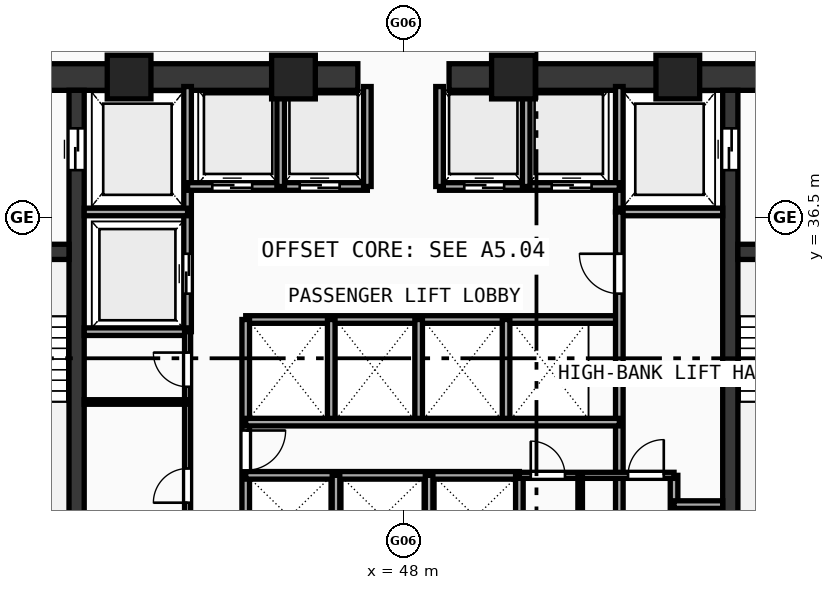
"""IFC4 building model, lengths in metres.
Left out: names, types, materials, properties, quantities, classifications, styles, units other than length and angle.
Written with IfcOpenShell. Run it as: python <this file> out.ifc"""

import sys

from ifc_helpers import new_model, si_unit, direction, frame, frame_2d, origin, origin_with_axes, origin_2d, place, context, subcontext, project, spatial, rectangle, hollow_rectangle, extrude, source, transform, mapped, element, fill, save


model = new_model("IFC4")
c1 = context("Model", 3, precision=1e-05, world=origin(), true_north=direction((0.0, 1.0)))
c2 = subcontext(c1, "Body", "Model", "MODEL_VIEW")
j1 = project(units=[si_unit("LENGTHUNIT", "METRE"), si_unit("PLANEANGLEUNIT", "RADIAN")], contexts=[c1])
p1 = place(None, origin())
s1 = spatial("IfcSite", under=j1, at=p1, CompositionType="ELEMENT")
p2 = place(p1, origin())
s2 = spatial("IfcBuilding", under=s1, at=p2, CompositionType="ELEMENT")
p3 = place(p2, frame((0.0, 0.0, 19.2)))
s3 = spatial("IfcBuildingStorey", under=s2, at=p3, CompositionType="ELEMENT", Elevation=19.2)
p4 = place(p3, frame((35.45, 40.2, 0.0), z_axis=(0.0, 0.0, 1.0), x_axis=(1.0, 0.0, 0.0)))
e1 = element("IfcWall", 1, at=p4, inside=s3, PredefinedType="SHEAR", context=c2, shape_type="SweptSolid", body=[
    extrude(rectangle(XDim=11.35, YDim=0.7, at=frame_2d((5.675, 0.0))), origin(), (0.0, 0.0, 1.0), 5.92),
])
p5 = place(p4, frame((1.7, 0.0, 0.0)))
e2 = element("IfcOpeningElement", 2, at=p5, cuts=e1, PredefinedType="OPENING", context=c2, shape_type="SweptSolid", body=[
    extrude(rectangle(XDim=1.05, YDim=2.1, at=frame_2d((0.525, 1.05))), frame((0.0, 0.36, 0.0), z_axis=(0.0, -1.0, 0.0), x_axis=(1.0, 0.0, 0.0)), (0.0, 0.0, 1.0), 0.72),
])
p6 = place(p3, frame((49.2, 40.2, 0.0), z_axis=(0.0, 0.0, 1.0), x_axis=(1.0, 0.0, 0.0)))
e3 = element("IfcWall", 3, at=p6, inside=s3, PredefinedType="SHEAR", context=c2, shape_type="SweptSolid", body=[
    extrude(rectangle(XDim=11.35, YDim=0.7, at=frame_2d((5.675, 0.0))), origin(), (0.0, 0.0, 1.0), 5.92),
])
p7 = place(p6, frame((8.6, 0.0, 0.0)))
e4 = element("IfcOpeningElement", 4, at=p7, cuts=e3, PredefinedType="OPENING", context=c2, shape_type="SweptSolid", body=[
    extrude(rectangle(XDim=1.05, YDim=2.1, at=frame_2d((0.525, 1.05))), frame((0.0, 0.36, 0.0), z_axis=(0.0, -1.0, 0.0), x_axis=(1.0, 0.0, 0.0)), (0.0, 0.0, 1.0), 0.72),
])
p8 = place(p3, frame((39.4, 27.85, 0.0), z_axis=(0.0, 0.0, 1.0), x_axis=(0.0, 1.0, 0.0)))
e5 = element("IfcWall", 5, at=p8, inside=s3, PredefinedType="SHEAR", context=c2, shape_type="SweptSolid", body=[
    extrude(rectangle(XDim=12.0, YDim=0.4, at=frame_2d((6.0, 0.0))), origin(), (0.0, 0.0, 1.0), 5.92),
])
p9 = place(p8, frame((9.9, 0.0, 0.0)))
e6 = element("IfcOpeningElement", 6, at=p9, cuts=e5, PredefinedType="OPENING", context=c2, shape_type="SweptSolid", body=[
    extrude(rectangle(XDim=1.1, YDim=2.1, at=frame_2d((0.55, 1.05))), frame((0.0, 0.21, 0.0), z_axis=(0.0, -1.0, 0.0), x_axis=(1.0, 0.0, 0.0)), (0.0, 0.0, 1.0), 0.42),
])
p10 = place(p3, frame((56.6, 27.85, 0.0), z_axis=(0.0, 0.0, 1.0), x_axis=(0.0, 1.0, 0.0)))
e7 = element("IfcWall", 7, at=p10, inside=s3, PredefinedType="SHEAR", context=c2, shape_type="SweptSolid", body=[
    extrude(rectangle(XDim=12.0, YDim=0.4, at=frame_2d((6.0, 0.0))), origin(), (0.0, 0.0, 1.0), 5.92),
])
p11 = place(p10, frame((9.9, 0.0, 0.0)))
e8 = element("IfcOpeningElement", 8, at=p11, cuts=e7, PredefinedType="OPENING", context=c2, shape_type="SweptSolid", body=[
    extrude(rectangle(XDim=1.1, YDim=2.1, at=frame_2d((0.55, 1.05))), frame((0.0, 0.21, 0.0), z_axis=(0.0, -1.0, 0.0), x_axis=(1.0, 0.0, 0.0)), (0.0, 0.0, 1.0), 0.42),
])
p12 = place(p3, frame((36.15, 35.6, 0.0), z_axis=(0.0, 0.0, 1.0), x_axis=(1.0, 0.0, 0.0)))
e9 = element("IfcWall", 9, at=p12, inside=s3, PredefinedType="SHEAR", context=c2, shape_type="SweptSolid", body=[
    extrude(rectangle(XDim=3.05, YDim=0.4, at=frame_2d((1.525, 0.0))), origin(), (0.0, 0.0, 1.0), 5.92),
])
p13 = place(p12, frame((0.97, 0.0, 0.0)))
e10 = element("IfcOpeningElement", 10, at=p13, cuts=e9, PredefinedType="OPENING", context=c2, shape_type="SweptSolid", body=[
    extrude(rectangle(XDim=1.05, YDim=2.1, at=frame_2d((0.525, 1.05))), frame((0.0, 0.21, 0.0), z_axis=(0.0, -1.0, 0.0), x_axis=(1.0, 0.0, 0.0)), (0.0, 0.0, 1.0), 0.42),
])
p14 = place(p3, frame((56.8, 35.6, 0.0), z_axis=(0.0, 0.0, 1.0), x_axis=(1.0, 0.0, 0.0)))
e11 = element("IfcWall", 11, at=p14, inside=s3, PredefinedType="SHEAR", context=c2, shape_type="SweptSolid", body=[
    extrude(rectangle(XDim=3.05, YDim=0.4, at=frame_2d((1.525, 0.0))), origin(), (0.0, 0.0, 1.0), 5.92),
])
p15 = place(p14, frame((1.02, 0.0, 0.0)))
e12 = element("IfcOpeningElement", 12, at=p15, cuts=e11, PredefinedType="OPENING", context=c2, shape_type="SweptSolid", body=[
    extrude(rectangle(XDim=1.05, YDim=2.1, at=frame_2d((0.525, 1.05))), frame((0.0, 0.21, 0.0), z_axis=(0.0, -1.0, 0.0), x_axis=(1.0, 0.0, 0.0)), (0.0, 0.0, 1.0), 0.42),
])
m1 = source(origin(), c2, "Body", "SweptSolid", [
    extrude(hollow_rectangle(XDim=1.15, YDim=1.15, WallThickness=0.048, at=origin_2d()), origin(), (0.0, 0.0, 1.0), 6.2),
])
for number, where, z_axis, x_axis in (
    (13, (55.219, 40.2, -0.28), (0.0, 0.0, 1.0), (1.0, 0.0, 0.0)),
    (14, (50.894, 40.2, -0.28), (0.0, 0.0, 1.0), (1.0, 0.0, 0.0)),
    (15, (45.106, 40.2, -0.28), (0.0, 0.0, 1.0), (1.0, 0.0, 0.0)),
    (16, (40.781, 40.2, -0.28), (0.0, 0.0, 1.0), (1.0, 0.0, 0.0)),
):
    element("IfcColumn", number, at=place(p3, frame(where, z_axis=z_axis, x_axis=x_axis)), inside=s3, PredefinedType="COLUMN", context=c2, shape_type="MappedRepresentation", body=[
        mapped(m1, transform((0.0, 0.0, 0.0), scale=1.0)),
    ])
p16 = place(p3, frame((42.32, 33.5, 0.0), z_axis=(0.0, 0.0, 1.0), x_axis=(0.0, 1.0, 0.0)))
e17 = element("IfcWall", 17, at=p16, inside=s3, PredefinedType="SOLIDWALL", context=c2, shape_type="SweptSolid", body=[
    extrude(rectangle(XDim=6.45, YDim=0.2, at=frame_2d((3.225, 0.0))), origin(), (0.0, 0.0, 1.0), 5.92),
])
p17 = place(p16, frame((1.0, 0.0, 0.0)))
e18 = element("IfcOpeningElement", 18, at=p17, cuts=e17, PredefinedType="OPENING", context=c2, shape_type="SweptSolid", body=[
    extrude(rectangle(XDim=1.05, YDim=2.1, at=frame_2d((0.525, 1.05))), frame((0.0, 0.11, 0.0), z_axis=(0.0, -1.0, 0.0), x_axis=(1.0, 0.0, 0.0)), (0.0, 0.0, 1.0), 0.22),
])
for number, where, z_axis, x_axis in (
    (19, (39.6, 36.65, 0.0), (0.0, 0.0, 1.0), (1.0, 0.0, 0.0)),
    (20, (39.6, 33.5, 0.0), (0.0, 0.0, 1.0), (1.0, 0.0, 0.0)),
):
    element("IfcWall", number, at=place(p3, frame(where, z_axis=z_axis, x_axis=x_axis)), inside=s3, PredefinedType="SOLIDWALL", context=c2, shape_type="SweptSolid", body=[
        extrude(rectangle(XDim=2.72, YDim=0.2, at=frame_2d((1.36, 0.0))), origin(), (0.0, 0.0, 1.0), 5.92),
    ])
p18 = place(p3, frame((53.68, 36.65, 0.0), z_axis=(0.0, 0.0, 1.0), x_axis=(0.0, 1.0, 0.0)))
e21 = element("IfcWall", 21, at=p18, inside=s3, PredefinedType="SOLIDWALL", context=c2, shape_type="SweptSolid", body=[
    extrude(rectangle(XDim=3.3, YDim=0.2, at=frame_2d((1.65, 0.0))), origin(), (0.0, 0.0, 1.0), 5.92),
])
p19 = place(p3, frame((53.68, 36.65, 0.0), z_axis=(0.0, 0.0, 1.0), x_axis=(1.0, 0.0, 0.0)))
e22 = element("IfcWall", 22, at=p19, inside=s3, PredefinedType="SOLIDWALL", context=c2, shape_type="SweptSolid", body=[
    extrude(rectangle(XDim=2.72, YDim=0.2, at=frame_2d((1.36, 0.0))), origin(), (0.0, 0.0, 1.0), 5.92),
])
p20 = place(p3, frame((42.32, 37.32, 0.0), z_axis=(0.0, 0.0, 1.0), x_axis=(1.0, 0.0, 0.0)))
e23 = element("IfcWall", 23, at=p20, inside=s3, PredefinedType="SOLIDWALL", context=c2, shape_type="SweptSolid", body=[
    extrude(rectangle(XDim=4.73, YDim=0.2, at=frame_2d((2.365, 0.0))), origin(), (0.0, 0.0, 1.0), 5.92),
])
p21 = place(p20, frame((0.65, 0.0, 0.0)))
e24 = element("IfcOpeningElement", 24, at=p21, cuts=e23, PredefinedType="OPENING", context=c2, shape_type="SweptSolid", body=[
    extrude(rectangle(XDim=1.05, YDim=2.1, at=frame_2d((0.525, 1.05))), frame((0.0, 0.11, 0.0), z_axis=(0.0, -1.0, 0.0), x_axis=(1.0, 0.0, 0.0)), (0.0, 0.0, 1.0), 0.22),
])
p22 = place(p20, frame((2.95, 0.0, 0.0)))
e25 = element("IfcOpeningElement", 25, at=p22, cuts=e23, PredefinedType="OPENING", context=c2, shape_type="SweptSolid", body=[
    extrude(rectangle(XDim=1.05, YDim=2.1, at=frame_2d((0.525, 1.05))), frame((0.0, 0.11, 0.0), z_axis=(0.0, -1.0, 0.0), x_axis=(1.0, 0.0, 0.0)), (0.0, 0.0, 1.0), 0.22),
])
p23 = place(p3, frame((48.95, 37.32, 0.0), z_axis=(0.0, 0.0, 1.0), x_axis=(1.0, 0.0, 0.0)))
e26 = element("IfcWall", 26, at=p23, inside=s3, PredefinedType="SOLIDWALL", context=c2, shape_type="SweptSolid", body=[
    extrude(rectangle(XDim=4.73, YDim=0.2, at=frame_2d((2.365, 0.0))), origin(), (0.0, 0.0, 1.0), 5.92),
])
p24 = place(p23, frame((0.65, 0.0, 0.0)))
e27 = element("IfcOpeningElement", 27, at=p24, cuts=e26, PredefinedType="OPENING", context=c2, shape_type="SweptSolid", body=[
    extrude(rectangle(XDim=1.05, YDim=2.1, at=frame_2d((0.525, 1.05))), frame((0.0, 0.11, 0.0), z_axis=(0.0, -1.0, 0.0), x_axis=(1.0, 0.0, 0.0)), (0.0, 0.0, 1.0), 0.22),
])
p25 = place(p23, frame((2.95, 0.0, 0.0)))
e28 = element("IfcOpeningElement", 28, at=p25, cuts=e26, PredefinedType="OPENING", context=c2, shape_type="SweptSolid", body=[
    extrude(rectangle(XDim=1.05, YDim=2.1, at=frame_2d((0.525, 1.05))), frame((0.0, 0.11, 0.0), z_axis=(0.0, -1.0, 0.0), x_axis=(1.0, 0.0, 0.0)), (0.0, 0.0, 1.0), 0.22),
])
for number, where, z_axis, x_axis in (
    (29, (47.05, 37.32, 0.0), (0.0, 0.0, 1.0), (0.0, 1.0, 0.0)),
    (30, (48.95, 37.32, 0.0), (0.0, 0.0, 1.0), (0.0, 1.0, 0.0)),
):
    element("IfcWall", number, at=place(p3, frame(where, z_axis=z_axis, x_axis=x_axis)), inside=s3, PredefinedType="SOLIDWALL", context=c2, shape_type="SweptSolid", body=[
        extrude(rectangle(XDim=2.63, YDim=0.2, at=frame_2d((1.315, 0.0))), origin(), (0.0, 0.0, 1.0), 5.92),
    ])
for number, where, z_axis, x_axis in (
    (31, (44.77, 37.32, 0.0), (0.0, 0.0, 1.0), (0.0, 1.0, 0.0)),
    (32, (51.23, 37.32, 0.0), (0.0, 0.0, 1.0), (0.0, 1.0, 0.0)),
):
    element("IfcWall", number, at=place(p3, frame(where, z_axis=z_axis, x_axis=x_axis)), inside=s3, PredefinedType="SOLIDWALL", context=c2, shape_type="SweptSolid", body=[
        extrude(rectangle(XDim=2.63, YDim=0.2, at=frame_2d((1.315, 0.0))), origin(), (0.0, 0.0, 1.0), 2.42),
    ])
p26 = place(p3, frame((43.85, 33.82, 0.0), z_axis=(0.0, 0.0, 1.0), x_axis=(1.0, 0.0, 0.0)))
e33 = element("IfcWall", 33, at=p26, inside=s3, PredefinedType="SOLIDWALL", context=c2, shape_type="SweptSolid", body=[
    extrude(rectangle(XDim=9.83, YDim=0.2, at=frame_2d((4.915, 0.0))), origin(), (0.0, 0.0, 1.0), 5.92),
])
p27 = place(p3, frame((43.85, 27.6, 0.0), z_axis=(0.0, 0.0, 1.0), x_axis=(0.0, 1.0, 0.0)))
e34 = element("IfcWall", 34, at=p27, inside=s3, PredefinedType="SOLIDWALL", context=c2, shape_type="SweptSolid", body=[
    extrude(rectangle(XDim=6.22, YDim=0.2, at=frame_2d((3.11, 0.0))), origin(), (0.0, 0.0, 1.0), 5.92),
])
p28 = place(p27, frame((2.25, 0.0, 0.0)))
e35 = element("IfcOpeningElement", 35, at=p28, cuts=e34, PredefinedType="OPENING", context=c2, shape_type="SweptSolid", body=[
    extrude(rectangle(XDim=1.05, YDim=2.1, at=frame_2d((0.525, 1.05))), frame((0.0, 0.11, 0.0), z_axis=(0.0, -1.0, 0.0), x_axis=(1.0, 0.0, 0.0)), (0.0, 0.0, 1.0), 0.22),
])
p29 = place(p3, frame((53.68, 27.6, 0.0), z_axis=(0.0, 0.0, 1.0), x_axis=(0.0, 1.0, 0.0)))
e36 = element("IfcWall", 36, at=p29, inside=s3, PredefinedType="SOLIDWALL", context=c2, shape_type="SweptSolid", body=[
    extrude(rectangle(XDim=9.05, YDim=0.2, at=frame_2d((4.525, 0.0))), origin(), (0.0, 0.0, 1.0), 2.42),
])
p30 = place(p29, frame((6.9, 0.0, 0.0)))
e37 = element("IfcOpeningElement", 37, at=p30, cuts=e36, PredefinedType="OPENING", context=c2, shape_type="SweptSolid", body=[
    extrude(rectangle(XDim=1.05, YDim=2.1, at=frame_2d((0.525, 1.05))), frame((0.0, 0.11, 0.0), z_axis=(0.0, -1.0, 0.0), x_axis=(1.0, 0.0, 0.0)), (0.0, 0.0, 1.0), 0.22),
])
for number, where, z_axis, x_axis in (
    (38, (46.1, 31.12, 0.0), (0.0, 0.0, 1.0), (0.0, 1.0, 0.0)),
    (39, (48.4, 31.12, 0.0), (0.0, 0.0, 1.0), (0.0, 1.0, 0.0)),
    (40, (50.7, 31.12, 0.0), (0.0, 0.0, 1.0), (0.0, 1.0, 0.0)),
):
    element("IfcWall", number, at=place(p3, frame(where, z_axis=z_axis, x_axis=x_axis)), inside=s3, PredefinedType="SOLIDWALL", context=c2, shape_type="SweptSolid", body=[
        extrude(rectangle(XDim=2.7, YDim=0.2, at=frame_2d((1.35, 0.0))), origin(), (0.0, 0.0, 1.0), 5.92),
    ])
p31 = place(p3, frame((43.85, 29.72, 0.0), z_axis=(0.0, 0.0, 1.0), x_axis=(1.0, 0.0, 0.0)))
e41 = element("IfcWall", 41, at=p31, inside=s3, PredefinedType="SOLIDWALL", context=c2, shape_type="SweptSolid", body=[
    extrude(rectangle(XDim=7.2, YDim=0.2, at=frame_2d((3.6, 0.0))), origin(), (0.0, 0.0, 1.0), 5.92),
])
p32 = place(p3, frame((51.05, 27.6, 0.0), z_axis=(0.0, 0.0, 1.0), x_axis=(0.0, 1.0, 0.0)))
e42 = element("IfcWall", 42, at=p32, inside=s3, PredefinedType="SOLIDWALL", context=c2, shape_type="SweptSolid", body=[
    extrude(rectangle(XDim=2.12, YDim=0.2, at=frame_2d((1.06, 0.0))), origin(), (0.0, 0.0, 1.0), 5.92),
])
p33 = place(p3, frame((43.85, 31.12, 0.0), z_axis=(0.0, 0.0, 1.0), x_axis=(1.0, 0.0, 0.0)))
e43 = element("IfcWall", 43, at=p33, inside=s3, PredefinedType="SOLIDWALL", context=c2, shape_type="SweptSolid", body=[
    extrude(rectangle(XDim=9.83, YDim=0.2, at=frame_2d((4.915, 0.0))), origin(), (0.0, 0.0, 1.0), 5.92),
])
p34 = place(p3, frame((46.225, 27.6, 0.0), z_axis=(0.0, 0.0, 1.0), x_axis=(0.0, 1.0, 0.0)))
e44 = element("IfcWall", 44, at=p34, inside=s3, PredefinedType="SOLIDWALL", context=c2, shape_type="SweptSolid", body=[
    extrude(rectangle(XDim=2.12, YDim=0.2, at=frame_2d((1.06, 0.0))), origin(), (0.0, 0.0, 1.0), 2.42),
])
for number, where, z_axis, x_axis in (
    (45, (48.675, 27.6, 0.0), (0.0, 0.0, 1.0), (0.0, 1.0, 0.0)),
    (46, (55.12, 27.6, 0.0), (0.0, 0.0, 1.0), (0.0, 1.0, 0.0)),
):
    element("IfcWall", number, at=place(p3, frame(where, z_axis=z_axis, x_axis=x_axis)), inside=s3, PredefinedType="SOLIDWALL", context=c2, shape_type="SweptSolid", body=[
        extrude(rectangle(XDim=2.12, YDim=0.2, at=frame_2d((1.06, 0.0))), origin(), (0.0, 0.0, 1.0), 5.92),
    ])
p35 = place(p3, frame((55.12, 28.95, 0.0), z_axis=(0.0, 0.0, 1.0), x_axis=(1.0, 0.0, 0.0)))
e47 = element("IfcWall", 47, at=p35, inside=s3, PredefinedType="SOLIDWALL", context=c2, shape_type="SweptSolid", body=[
    extrude(rectangle(XDim=1.28, YDim=0.2, at=frame_2d((0.64, 0.0))), origin(), (0.0, 0.0, 1.0), 5.92),
])
p36 = place(p3, frame((42.32, 27.6, 0.0), z_axis=(0.0, 0.0, 1.0), x_axis=(0.0, 1.0, 0.0)))
e48 = element("IfcWall", 48, at=p36, inside=s3, PredefinedType="PARTITIONING", context=c2, shape_type="SweptSolid", body=[
    extrude(rectangle(XDim=5.9, YDim=0.16, at=frame_2d((2.95, 0.0))), origin(), (0.0, 0.0, 1.0), 2.42),
])
p37 = place(p36, frame((1.4, 0.0, 0.0)))
e49 = element("IfcOpeningElement", 49, at=p37, cuts=e48, PredefinedType="OPENING", context=c2, shape_type="SweptSolid", body=[
    extrude(rectangle(XDim=0.9, YDim=2.1, at=frame_2d((0.45, 1.05))), frame((0.0, 0.09, 0.0), z_axis=(0.0, -1.0, 0.0), x_axis=(1.0, 0.0, 0.0)), (0.0, 0.0, 1.0), 0.18),
])
p38 = place(p36, frame((4.45, 0.0, 0.0)))
e50 = element("IfcOpeningElement", 50, at=p38, cuts=e48, PredefinedType="OPENING", context=c2, shape_type="SweptSolid", body=[
    extrude(rectangle(XDim=0.9, YDim=2.1, at=frame_2d((0.45, 1.05))), frame((0.0, 0.09, 0.0), z_axis=(0.0, -1.0, 0.0), x_axis=(1.0, 0.0, 0.0)), (0.0, 0.0, 1.0), 0.18),
])
p39 = place(p3, frame((51.05, 29.72, 0.0), z_axis=(0.0, 0.0, 1.0), x_axis=(1.0, 0.0, 0.0)))
e51 = element("IfcWall", 51, at=p39, inside=s3, PredefinedType="PARTITIONING", context=c2, shape_type="SweptSolid", body=[
    extrude(rectangle(XDim=4.07, YDim=0.16, at=frame_2d((2.035, 0.0))), origin(), (0.0, 0.0, 1.0), 5.92),
])
p40 = place(p39, frame((0.3, 0.0, 0.0)))
e52 = element("IfcOpeningElement", 52, at=p40, cuts=e51, PredefinedType="OPENING", context=c2, shape_type="SweptSolid", body=[
    extrude(rectangle(XDim=0.9, YDim=2.1, at=frame_2d((0.45, 1.05))), frame((0.0, 0.09, 0.0), z_axis=(0.0, -1.0, 0.0), x_axis=(1.0, 0.0, 0.0)), (0.0, 0.0, 1.0), 0.18),
])
p41 = place(p39, frame((2.86, 0.0, 0.0)))
e53 = element("IfcOpeningElement", 53, at=p41, cuts=e51, PredefinedType="OPENING", context=c2, shape_type="SweptSolid", body=[
    extrude(rectangle(XDim=0.94, YDim=2.1, at=frame_2d((0.47, 1.05))), frame((0.0, 0.09, 0.0), z_axis=(0.0, -1.0, 0.0), x_axis=(1.0, 0.0, 0.0)), (0.0, 0.0, 1.0), 0.18),
])
p42 = place(p3, frame((39.6, 31.65, 0.0), z_axis=(0.0, 0.0, 1.0), x_axis=(1.0, 0.0, 0.0)))
e54 = element("IfcWall", 54, at=p42, inside=s3, PredefinedType="PARTITIONING", context=c2, shape_type="SweptSolid", body=[
    extrude(rectangle(XDim=2.72, YDim=0.12, at=frame_2d((1.36, 0.0))), origin(), (0.0, 0.0, 1.0), 5.92),
])
p43 = place(p3, frame((52.65, 27.6, 0.0), z_axis=(0.0, 0.0, 1.0), x_axis=(0.0, 1.0, 0.0)))
e55 = element("IfcWall", 55, at=p43, inside=s3, PredefinedType="PARTITIONING", context=c2, shape_type="SweptSolid", body=[
    extrude(rectangle(XDim=2.12, YDim=0.12, at=frame_2d((1.06, 0.0))), origin(), (0.0, 0.0, 1.0), 5.92),
])
m2 = source(origin(), c2, "Body", "SweptSolid", [
    extrude(rectangle(XDim=1.1, YDim=2.1, at=frame_2d((0.55, 1.05))), frame((0.0, 0.025, 0.0), z_axis=(0.0, -1.0, 0.0), x_axis=(1.0, 0.0, 0.0)), (0.0, 0.0, 1.0), 0.05),
])
p44 = place(p9, frame((1.1, 0.0, 0.0), z_axis=(0.0, 0.0, 1.0), x_axis=(-1.0, 0.0, 0.0)))
e56 = element("IfcDoor", 56, at=p44, inside=s3, OperationType="DOUBLE_DOOR_SLIDING", PredefinedType="DOOR", context=c2, shape_type="MappedRepresentation", body=[
    mapped(m2, transform((0.0, 0.0, 0.0), scale=1.0)),
])
fill(e6, e56)
p45 = place(p11, origin_with_axes())
e57 = element("IfcDoor", 57, at=p45, inside=s3, OperationType="DOUBLE_DOOR_SLIDING", PredefinedType="DOOR", context=c2, shape_type="MappedRepresentation", body=[
    mapped(m2, transform((0.0, 0.0, 0.0), scale=1.0)),
])
fill(e8, e57)
m3 = source(origin(), c2, "Body", "SweptSolid", [
    extrude(rectangle(XDim=1.05, YDim=2.1, at=frame_2d((0.525, 1.05))), frame((0.0, 0.025, 0.0), z_axis=(0.0, -1.0, 0.0), x_axis=(1.0, 0.0, 0.0)), (0.0, 0.0, 1.0), 0.05),
])
p46 = place(p17, origin_with_axes())
e58 = element("IfcDoor", 58, at=p46, inside=s3, OperationType="DOUBLE_DOOR_SLIDING", PredefinedType="DOOR", context=c2, shape_type="MappedRepresentation", body=[
    mapped(m3, transform((0.0, 0.0, 0.0), scale=1.0)),
])
fill(e18, e58)
p47 = place(p21, frame((1.05, 0.0, 0.0), z_axis=(0.0, 0.0, 1.0), x_axis=(-1.0, 0.0, 0.0)))
e59 = element("IfcDoor", 59, at=p47, inside=s3, OperationType="DOUBLE_DOOR_SLIDING", PredefinedType="DOOR", context=c2, shape_type="MappedRepresentation", body=[
    mapped(m3, transform((0.0, 0.0, 0.0), scale=1.0)),
])
fill(e24, e59)
p48 = place(p22, frame((1.05, 0.0, 0.0), z_axis=(0.0, 0.0, 1.0), x_axis=(-1.0, 0.0, 0.0)))
e60 = element("IfcDoor", 60, at=p48, inside=s3, OperationType="DOUBLE_DOOR_SLIDING", PredefinedType="DOOR", context=c2, shape_type="MappedRepresentation", body=[
    mapped(m3, transform((0.0, 0.0, 0.0), scale=1.0)),
])
fill(e25, e60)
p49 = place(p24, frame((1.05, 0.0, 0.0), z_axis=(0.0, 0.0, 1.0), x_axis=(-1.0, 0.0, 0.0)))
e61 = element("IfcDoor", 61, at=p49, inside=s3, OperationType="DOUBLE_DOOR_SLIDING", PredefinedType="DOOR", context=c2, shape_type="MappedRepresentation", body=[
    mapped(m3, transform((0.0, 0.0, 0.0), scale=1.0)),
])
fill(e27, e61)
p50 = place(p25, frame((1.05, 0.0, 0.0), z_axis=(0.0, 0.0, 1.0), x_axis=(-1.0, 0.0, 0.0)))
e62 = element("IfcDoor", 62, at=p50, inside=s3, OperationType="DOUBLE_DOOR_SLIDING", PredefinedType="DOOR", context=c2, shape_type="MappedRepresentation", body=[
    mapped(m3, transform((0.0, 0.0, 0.0), scale=1.0)),
])
fill(e28, e62)
p51 = place(p28, frame((1.05, 0.0, 0.0), z_axis=(0.0, 0.0, 1.0), x_axis=(-1.0, 0.0, 0.0)))
e63 = element("IfcDoor", 63, at=p51, inside=s3, OperationType="SINGLE_SWING_LEFT", PredefinedType="DOOR", context=c2, shape_type="MappedRepresentation", body=[
    mapped(m3, transform((0.0, 0.0, 0.0), scale=1.0)),
])
fill(e35, e63)
p52 = place(p30, origin_with_axes())
e64 = element("IfcDoor", 64, at=p52, inside=s3, OperationType="SINGLE_SWING_RIGHT", PredefinedType="DOOR", context=c2, shape_type="MappedRepresentation", body=[
    mapped(m3, transform((0.0, 0.0, 0.0), scale=1.0)),
])
fill(e37, e64)
m4 = source(origin(), c2, "Body", "SweptSolid", [
    extrude(rectangle(XDim=0.9, YDim=2.1, at=frame_2d((0.45, 1.05))), frame((0.0, 0.025, 0.0), z_axis=(0.0, -1.0, 0.0), x_axis=(1.0, 0.0, 0.0)), (0.0, 0.0, 1.0), 0.05),
])
p53 = place(p37, origin_with_axes())
e65 = element("IfcDoor", 65, at=p53, inside=s3, OperationType="SINGLE_SWING_LEFT", PredefinedType="DOOR", context=c2, shape_type="MappedRepresentation", body=[
    mapped(m4, transform((0.0, 0.0, 0.0), scale=1.0)),
])
fill(e49, e65)
p54 = place(p38, origin_with_axes())
e66 = element("IfcDoor", 66, at=p54, inside=s3, OperationType="SINGLE_SWING_RIGHT", PredefinedType="DOOR", context=c2, shape_type="MappedRepresentation", body=[
    mapped(m4, transform((0.0, 0.0, 0.0), scale=1.0)),
])
fill(e50, e66)
p55 = place(p40, origin_with_axes())
e67 = element("IfcDoor", 67, at=p55, inside=s3, OperationType="SINGLE_SWING_LEFT", PredefinedType="DOOR", context=c2, shape_type="MappedRepresentation", body=[
    mapped(m4, transform((0.0, 0.0, 0.0), scale=1.0)),
])
fill(e52, e67)
m5 = source(origin(), c2, "Body", "SweptSolid", [
    extrude(rectangle(XDim=0.94, YDim=2.1, at=frame_2d((0.47, 1.05))), frame((0.0, 0.025, 0.0), z_axis=(0.0, -1.0, 0.0), x_axis=(1.0, 0.0, 0.0)), (0.0, 0.0, 1.0), 0.05),
])
p56 = place(p41, origin_with_axes())
e68 = element("IfcDoor", 68, at=p56, inside=s3, OperationType="SINGLE_SWING_RIGHT", PredefinedType="DOOR", context=c2, shape_type="MappedRepresentation", body=[
    mapped(m5, transform((0.0, 0.0, 0.0), scale=1.0)),
])
fill(e53, e68)
save(model, sys.argv[1])
